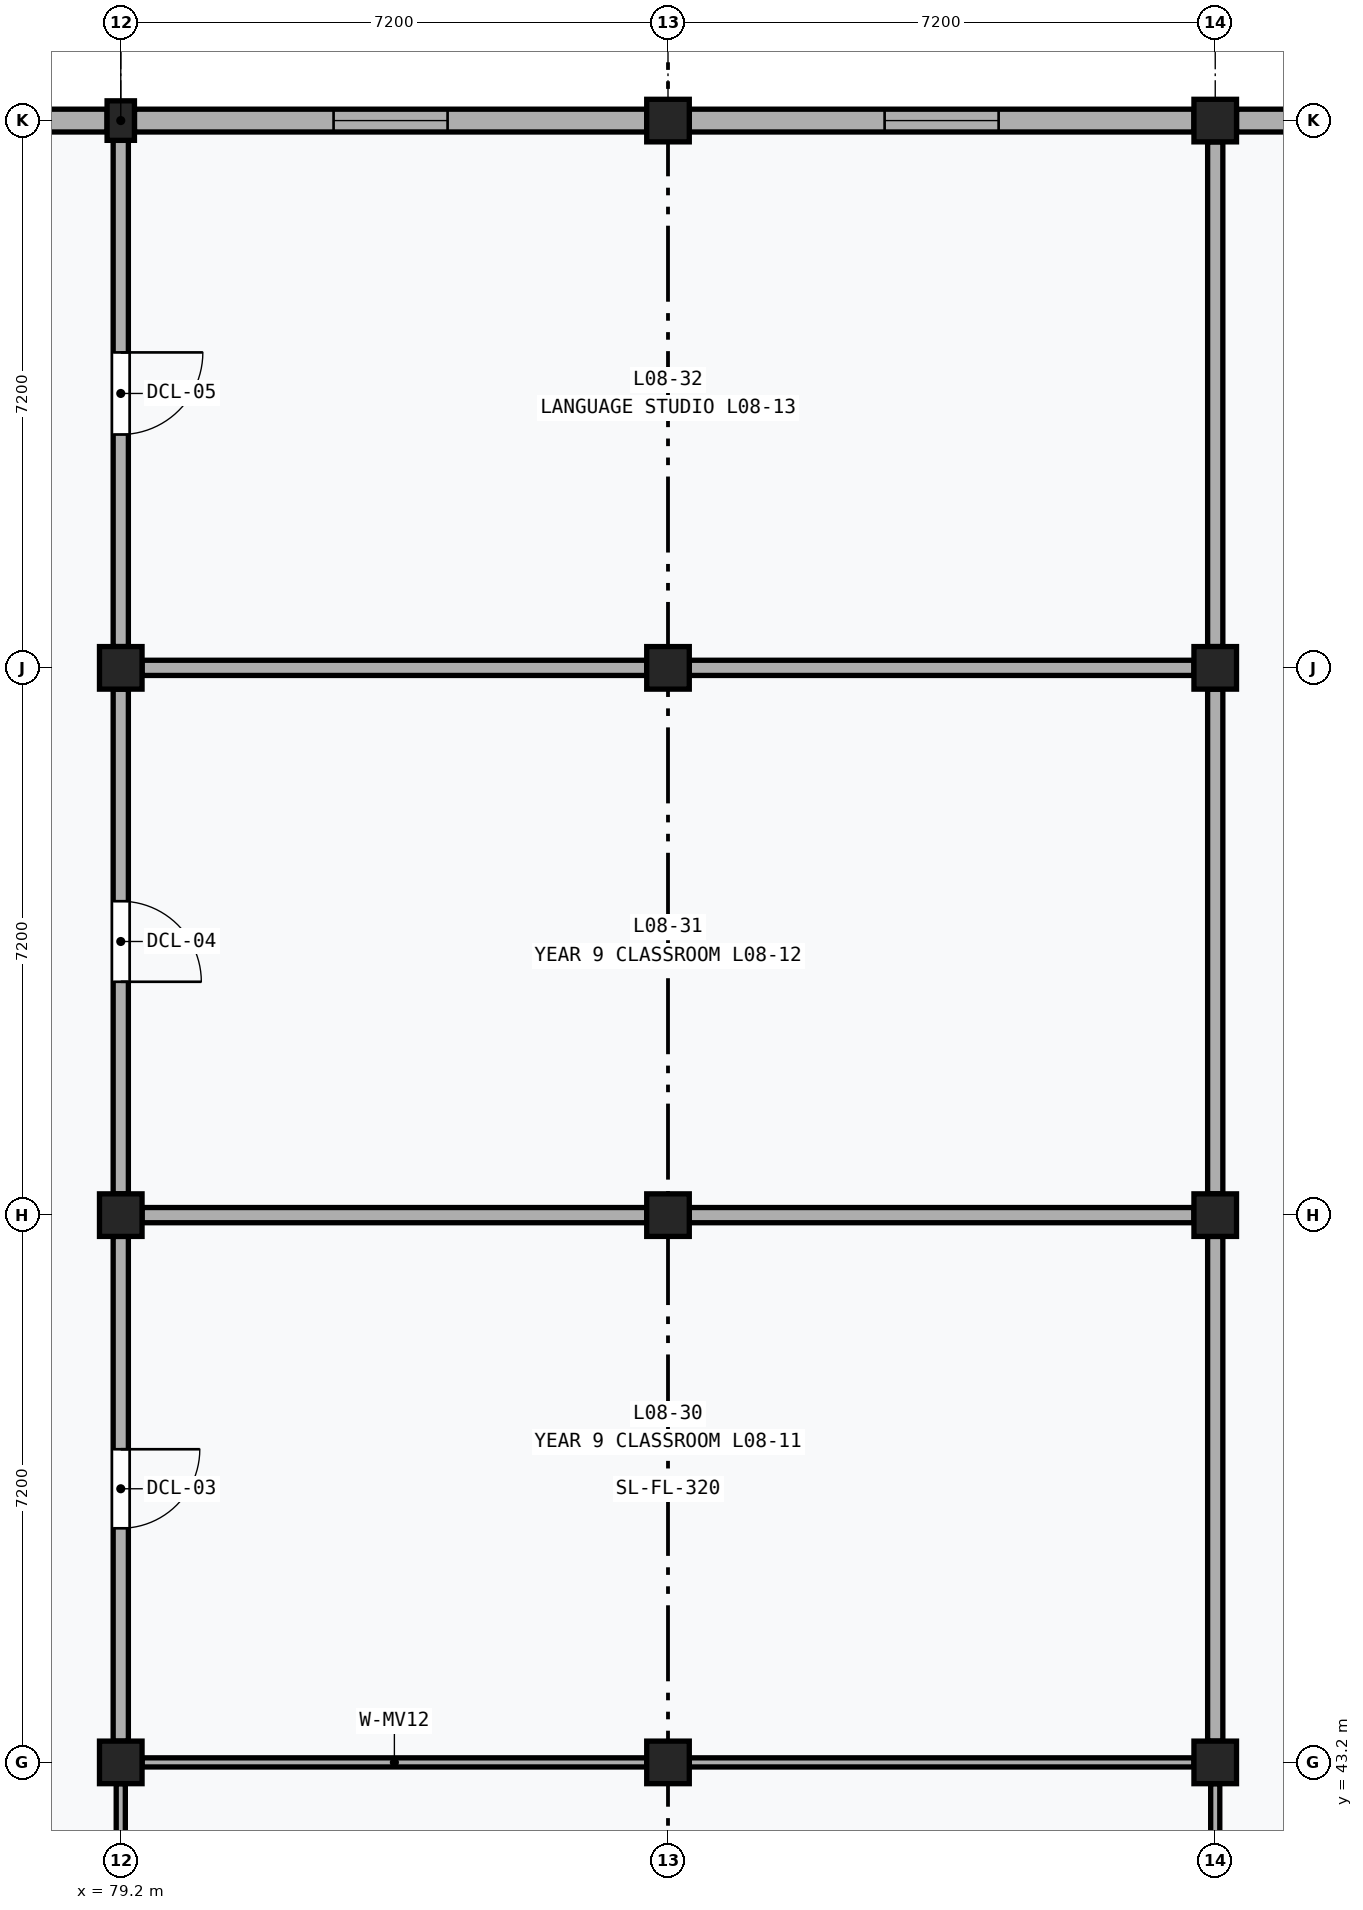
"""IFC4 building model, lengths in metres.
Left out: names, types, materials, properties, quantities, classifications, styles, units other than length and angle.
Written with IfcOpenShell. Run it as: python <this file> out.ifc"""

import sys

from ifc_helpers import new_model, si_unit, direction, frame, frame_2d, origin, origin_2d, place, context, subcontext, project, spatial, rectangle, extrude, element, fill, save


model = new_model("IFC4")
c1 = context("Model", 3, precision=1e-05, world=origin(), true_north=direction((0.0, 1.0)))
c2 = subcontext(c1, "Body", "Model", "MODEL_VIEW")
j1 = project(units=[si_unit("LENGTHUNIT", "METRE"), si_unit("PLANEANGLEUNIT", "RADIAN")], contexts=[c1])
p1 = place(None, origin())
s1 = spatial("IfcSite", under=j1, at=p1, CompositionType="ELEMENT")
p2 = place(p1, origin())
s2 = spatial("IfcBuilding", under=s1, at=p2, CompositionType="ELEMENT")
p3 = place(p2, frame((0.0, 0.0, 34.8)))
s3 = spatial("IfcBuildingStorey", under=s2, at=p3, CompositionType="ELEMENT", Elevation=34.8)
for number, where, z_axis, x_axis in (
    (1, (79.2, 43.2, 0.0), (0.0, 0.0, 1.0), (1.0, 0.0, 0.0)),
    (2, (79.2, 50.4, 0.0), (0.0, 0.0, 1.0), (1.0, 0.0, 0.0)),
    (3, (79.2, 57.6, 0.0), (0.0, 0.0, 1.0), (1.0, 0.0, 0.0)),
):
    element("IfcColumn", number, at=place(p3, frame(where, z_axis=z_axis, x_axis=x_axis)), inside=s3, PredefinedType="COLUMN", context=c2, shape_type="SweptSolid", body=[
        extrude(rectangle(XDim=0.56, YDim=0.56, at=origin_2d()), origin(), (0.0, 0.0, 1.0), 4.0),
    ])
p4 = place(p3, frame((79.2, 64.8, 0.0), z_axis=(0.0, 0.0, 1.0), x_axis=(1.0, 0.0, 0.0)))
e4 = element("IfcColumn", 4, at=p4, inside=s3, PredefinedType="PILASTER", context=c2, shape_type="SweptSolid", body=[
    extrude(rectangle(XDim=0.36, YDim=0.52, at=origin_2d()), origin(), (0.0, 0.0, 1.0), 4.0),
])
for number, where, z_axis, x_axis in (
    (5, (86.4, 43.2, 0.0), (0.0, 0.0, 1.0), (1.0, 0.0, 0.0)),
    (6, (86.4, 50.4, 0.0), (0.0, 0.0, 1.0), (1.0, 0.0, 0.0)),
    (7, (86.4, 57.6, 0.0), (0.0, 0.0, 1.0), (1.0, 0.0, 0.0)),
    (8, (86.4, 64.8, 0.0), (0.0, 0.0, 1.0), (1.0, 0.0, 0.0)),
    (9, (93.6, 43.2, 0.0), (0.0, 0.0, 1.0), (1.0, 0.0, 0.0)),
    (10, (93.6, 50.4, 0.0), (0.0, 0.0, 1.0), (1.0, 0.0, 0.0)),
    (11, (93.6, 57.6, 0.0), (0.0, 0.0, 1.0), (1.0, 0.0, 0.0)),
    (12, (93.6, 64.8, 0.0), (0.0, 0.0, 1.0), (1.0, 0.0, 0.0)),
):
    element("IfcColumn", number, at=place(p3, frame(where, z_axis=z_axis, x_axis=x_axis)), inside=s3, PredefinedType="COLUMN", context=c2, shape_type="SweptSolid", body=[
        extrude(rectangle(XDim=0.56, YDim=0.56, at=origin_2d()), origin(), (0.0, 0.0, 1.0), 4.0),
    ])
p5 = place(p3, frame((72.28, 64.8, 0.0), z_axis=(0.0, 0.0, 1.0), x_axis=(1.0, 0.0, 0.0)))
e13 = element("IfcWall", 13, at=p5, inside=s3, PredefinedType="SOLIDWALL", context=c2, shape_type="SweptSolid", body=[
    extrude(rectangle(XDim=6.74, YDim=0.3, at=frame_2d((3.37, 0.0))), origin(), (0.0, 0.0, 1.0), 3.19),
])
p6 = place(p5, frame((2.495, 0.0, 1.2)))
e14 = element("IfcOpeningElement", 14, at=p6, cuts=e13, PredefinedType="OPENING", context=c2, shape_type="SweptSolid", body=[
    extrude(rectangle(XDim=1.75, YDim=1.35, at=frame_2d((0.875, 0.675))), frame((0.0, 0.162, 0.0), z_axis=(0.0, -1.0, 0.0), x_axis=(1.0, 0.0, 0.0)), (0.0, 0.0, 1.0), 0.324),
])
p7 = place(p3, frame((79.38, 64.8, 0.0), z_axis=(0.0, 0.0, 1.0), x_axis=(1.0, 0.0, 0.0)))
e15 = element("IfcWall", 15, at=p7, inside=s3, PredefinedType="SOLIDWALL", context=c2, shape_type="SweptSolid", body=[
    extrude(rectangle(XDim=6.74, YDim=0.3, at=frame_2d((3.37, 0.0))), origin(), (0.0, 0.0, 1.0), 3.19),
])
p8 = place(p7, frame((2.62, 0.0, 1.1)))
e16 = element("IfcOpeningElement", 16, at=p8, cuts=e15, PredefinedType="OPENING", context=c2, shape_type="SweptSolid", body=[
    extrude(rectangle(XDim=1.5, YDim=1.35, at=frame_2d((0.75, 0.675))), frame((0.0, 0.162, 0.0), z_axis=(0.0, -1.0, 0.0), x_axis=(1.0, 0.0, 0.0)), (0.0, 0.0, 1.0), 0.324),
])
p9 = place(p3, frame((86.68, 64.8, 0.0), z_axis=(0.0, 0.0, 1.0), x_axis=(1.0, 0.0, 0.0)))
e17 = element("IfcWall", 17, at=p9, inside=s3, PredefinedType="SOLIDWALL", context=c2, shape_type="SweptSolid", body=[
    extrude(rectangle(XDim=6.64, YDim=0.3, at=frame_2d((3.32, 0.0))), origin(), (0.0, 0.0, 1.0), 3.19),
])
p10 = place(p9, frame((2.57, 0.0, 1.1)))
e18 = element("IfcOpeningElement", 18, at=p10, cuts=e17, PredefinedType="OPENING", context=c2, shape_type="SweptSolid", body=[
    extrude(rectangle(XDim=1.5, YDim=1.35, at=frame_2d((0.75, 0.675))), frame((0.0, 0.162, 0.0), z_axis=(0.0, -1.0, 0.0), x_axis=(1.0, 0.0, 0.0)), (0.0, 0.0, 1.0), 0.324),
])
p11 = place(p3, frame((93.88, 64.8, 0.0), z_axis=(0.0, 0.0, 1.0), x_axis=(1.0, 0.0, 0.0)))
e19 = element("IfcWall", 19, at=p11, inside=s3, PredefinedType="SOLIDWALL", context=c2, shape_type="SweptSolid", body=[
    extrude(rectangle(XDim=6.64, YDim=0.3, at=frame_2d((3.32, 0.0))), origin(), (0.0, 0.0, 1.0), 3.19),
])
p12 = place(p11, frame((2.57, 0.0, 1.1)))
e20 = element("IfcOpeningElement", 20, at=p12, cuts=e19, PredefinedType="OPENING", context=c2, shape_type="SweptSolid", body=[
    extrude(rectangle(XDim=1.5, YDim=1.35, at=frame_2d((0.75, 0.675))), frame((0.0, 0.162, 0.0), z_axis=(0.0, -1.0, 0.0), x_axis=(1.0, 0.0, 0.0)), (0.0, 0.0, 1.0), 0.324),
])
p13 = place(p3, frame((79.48, 43.2, 0.0), z_axis=(0.0, 0.0, 1.0), x_axis=(1.0, 0.0, 0.0)))
e21 = element("IfcWall", 21, at=p13, inside=s3, PredefinedType="MOVABLE", context=c2, shape_type="SweptSolid", body=[
    extrude(rectangle(XDim=6.64, YDim=0.12, at=frame_2d((3.32, 0.0))), origin(), (0.0, 0.0, 1.0), 3.03),
])
p14 = place(p3, frame((79.2, 36.28, 0.0), z_axis=(0.0, 0.0, 1.0), x_axis=(0.0, 1.0, 0.0)))
e22 = element("IfcWall", 22, at=p14, inside=s3, PredefinedType="MOVABLE", context=c2, shape_type="SweptSolid", body=[
    extrude(rectangle(XDim=6.64, YDim=0.12, at=frame_2d((3.32, 0.0))), origin(), (0.0, 0.0, 1.0), 3.03),
])
p15 = place(p14, frame((2.81, 0.0, 0.0)))
e23 = element("IfcOpeningElement", 23, at=p15, cuts=e22, PredefinedType="OPENING", context=c2, shape_type="SweptSolid", body=[
    extrude(rectangle(XDim=1.02, YDim=2.12, at=frame_2d((0.51, 1.06))), frame((0.0, 0.072, 0.0), z_axis=(0.0, -1.0, 0.0), x_axis=(1.0, 0.0, 0.0)), (0.0, 0.0, 1.0), 0.144),
])
p16 = place(p3, frame((86.68, 43.2, 0.0), z_axis=(0.0, 0.0, 1.0), x_axis=(1.0, 0.0, 0.0)))
e24 = element("IfcWall", 24, at=p16, inside=s3, PredefinedType="MOVABLE", context=c2, shape_type="SweptSolid", body=[
    extrude(rectangle(XDim=6.64, YDim=0.12, at=frame_2d((3.32, 0.0))), origin(), (0.0, 0.0, 1.0), 3.03),
])
p17 = place(p3, frame((93.6, 36.28, 0.0), z_axis=(0.0, 0.0, 1.0), x_axis=(0.0, 1.0, 0.0)))
e25 = element("IfcWall", 25, at=p17, inside=s3, PredefinedType="MOVABLE", context=c2, shape_type="SweptSolid", body=[
    extrude(rectangle(XDim=6.64, YDim=0.12, at=frame_2d((3.32, 0.0))), origin(), (0.0, 0.0, 1.0), 3.03),
])
p18 = place(p3, frame((79.48, 50.4, 0.0), z_axis=(0.0, 0.0, 1.0), x_axis=(1.0, 0.0, 0.0)))
e26 = element("IfcWall", 26, at=p18, inside=s3, PredefinedType="PARTITIONING", context=c2, shape_type="SweptSolid", body=[
    extrude(rectangle(XDim=6.64, YDim=0.2, at=frame_2d((3.32, 0.0))), origin(), (0.0, 0.0, 1.0), 3.03),
])
p19 = place(p3, frame((79.2, 43.48, 0.0), z_axis=(0.0, 0.0, 1.0), x_axis=(0.0, 1.0, 0.0)))
e27 = element("IfcWall", 27, at=p19, inside=s3, PredefinedType="PARTITIONING", context=c2, shape_type="SweptSolid", body=[
    extrude(rectangle(XDim=6.64, YDim=0.2, at=frame_2d((3.32, 0.0))), origin(), (0.0, 0.0, 1.0), 3.03),
])
p20 = place(p19, frame((2.8, 0.0, 0.0)))
e28 = element("IfcOpeningElement", 28, at=p20, cuts=e27, PredefinedType="OPENING", context=c2, shape_type="SweptSolid", body=[
    extrude(rectangle(XDim=1.04, YDim=2.14, at=frame_2d((0.52, 1.07))), frame((0.0, 0.112, 0.0), z_axis=(0.0, -1.0, 0.0), x_axis=(1.0, 0.0, 0.0)), (0.0, 0.0, 1.0), 0.224),
])
for number, where, z_axis, x_axis in (
    (29, (86.68, 50.4, 0.0), (0.0, 0.0, 1.0), (1.0, 0.0, 0.0)),
    (30, (93.6, 43.48, 0.0), (0.0, 0.0, 1.0), (0.0, 1.0, 0.0)),
    (31, (79.48, 57.6, 0.0), (0.0, 0.0, 1.0), (1.0, 0.0, 0.0)),
):
    element("IfcWall", number, at=place(p3, frame(where, z_axis=z_axis, x_axis=x_axis)), inside=s3, PredefinedType="PARTITIONING", context=c2, shape_type="SweptSolid", body=[
        extrude(rectangle(XDim=6.64, YDim=0.2, at=frame_2d((3.32, 0.0))), origin(), (0.0, 0.0, 1.0), 3.03),
    ])
p21 = place(p3, frame((79.2, 50.68, 0.0), z_axis=(0.0, 0.0, 1.0), x_axis=(0.0, 1.0, 0.0)))
e32 = element("IfcWall", 32, at=p21, inside=s3, PredefinedType="PARTITIONING", context=c2, shape_type="SweptSolid", body=[
    extrude(rectangle(XDim=6.64, YDim=0.2, at=frame_2d((3.32, 0.0))), origin(), (0.0, 0.0, 1.0), 3.03),
])
p22 = place(p21, frame((2.79, 0.0, 0.0)))
e33 = element("IfcOpeningElement", 33, at=p22, cuts=e32, PredefinedType="OPENING", context=c2, shape_type="SweptSolid", body=[
    extrude(rectangle(XDim=1.06, YDim=2.16, at=frame_2d((0.53, 1.08))), frame((0.0, 0.112, 0.0), z_axis=(0.0, -1.0, 0.0), x_axis=(1.0, 0.0, 0.0)), (0.0, 0.0, 1.0), 0.224),
])
for number, where, z_axis, x_axis in (
    (34, (86.68, 57.6, 0.0), (0.0, 0.0, 1.0), (1.0, 0.0, 0.0)),
    (35, (93.6, 50.68, 0.0), (0.0, 0.0, 1.0), (0.0, 1.0, 0.0)),
):
    element("IfcWall", number, at=place(p3, frame(where, z_axis=z_axis, x_axis=x_axis)), inside=s3, PredefinedType="PARTITIONING", context=c2, shape_type="SweptSolid", body=[
        extrude(rectangle(XDim=6.64, YDim=0.2, at=frame_2d((3.32, 0.0))), origin(), (0.0, 0.0, 1.0), 3.03),
    ])
p23 = place(p3, frame((79.2, 57.88, 0.0), z_axis=(0.0, 0.0, 1.0), x_axis=(0.0, 1.0, 0.0)))
e36 = element("IfcWall", 36, at=p23, inside=s3, PredefinedType="PARTITIONING", context=c2, shape_type="SweptSolid", body=[
    extrude(rectangle(XDim=6.66, YDim=0.2, at=frame_2d((3.33, 0.0))), origin(), (0.0, 0.0, 1.0), 3.03),
])
p24 = place(p23, frame((2.79, 0.0, 0.0)))
e37 = element("IfcOpeningElement", 37, at=p24, cuts=e36, PredefinedType="OPENING", context=c2, shape_type="SweptSolid", body=[
    extrude(rectangle(XDim=1.08, YDim=2.18, at=frame_2d((0.54, 1.09))), frame((0.0, 0.112, 0.0), z_axis=(0.0, -1.0, 0.0), x_axis=(1.0, 0.0, 0.0)), (0.0, 0.0, 1.0), 0.224),
])
p25 = place(p3, frame((93.6, 57.88, 0.0), z_axis=(0.0, 0.0, 1.0), x_axis=(0.0, 1.0, 0.0)))
e38 = element("IfcWall", 38, at=p25, inside=s3, PredefinedType="PARTITIONING", context=c2, shape_type="SweptSolid", body=[
    extrude(rectangle(XDim=6.64, YDim=0.2, at=frame_2d((3.32, 0.0))), origin(), (0.0, 0.0, 1.0), 3.03),
])
p26 = place(p8, origin())
e39 = element("IfcWindow", 39, at=p26, inside=s3, PartitioningType="SINGLE_PANEL", PredefinedType="WINDOW", context=c2, shape_type="SweptSolid", body=[
    extrude(rectangle(XDim=1.5, YDim=1.35, at=frame_2d((0.75, 0.675))), frame((0.0, 0.03, 0.0), z_axis=(0.0, -1.0, 0.0), x_axis=(1.0, 0.0, 0.0)), (0.0, 0.0, 1.0), 0.06),
])
fill(e16, e39)
p27 = place(p10, origin())
e40 = element("IfcWindow", 40, at=p27, inside=s3, PartitioningType="SINGLE_PANEL", PredefinedType="WINDOW", context=c2, shape_type="SweptSolid", body=[
    extrude(rectangle(XDim=1.5, YDim=1.35, at=frame_2d((0.75, 0.675))), frame((0.0, 0.03, 0.0), z_axis=(0.0, -1.0, 0.0), x_axis=(1.0, 0.0, 0.0)), (0.0, 0.0, 1.0), 0.06),
])
fill(e18, e40)
p28 = place(p20, frame((1.04, 0.0, 0.0), z_axis=(0.0, 0.0, 1.0), x_axis=(-1.0, 0.0, 0.0)))
e41 = element("IfcDoor", 41, at=p28, inside=s3, OperationType="SINGLE_SWING_LEFT", PredefinedType="DOOR", context=c2, shape_type="SweptSolid", body=[
    extrude(rectangle(XDim=1.04, YDim=2.14, at=frame_2d((0.52, 1.07))), frame((0.0, 0.025, 0.0), z_axis=(0.0, -1.0, 0.0), x_axis=(1.0, 0.0, 0.0)), (0.0, 0.0, 1.0), 0.05),
])
fill(e28, e41)
p29 = place(p22, frame((1.06, 0.0, 0.0), z_axis=(0.0, 0.0, 1.0), x_axis=(-1.0, 0.0, 0.0)))
e42 = element("IfcDoor", 42, at=p29, inside=s3, OperationType="SINGLE_SWING_RIGHT", PredefinedType="DOOR", context=c2, shape_type="SweptSolid", body=[
    extrude(rectangle(XDim=1.06, YDim=2.16, at=frame_2d((0.53, 1.08))), frame((0.0, 0.025, 0.0), z_axis=(0.0, -1.0, 0.0), x_axis=(1.0, 0.0, 0.0)), (0.0, 0.0, 1.0), 0.05),
])
fill(e33, e42)
p30 = place(p24, frame((1.08, 0.0, 0.0), z_axis=(0.0, 0.0, 1.0), x_axis=(-1.0, 0.0, 0.0)))
e43 = element("IfcDoor", 43, at=p30, inside=s3, OperationType="SINGLE_SWING_LEFT", PredefinedType="DOOR", context=c2, shape_type="SweptSolid", body=[
    extrude(rectangle(XDim=1.08, YDim=2.18, at=frame_2d((0.54, 1.09))), frame((0.0, 0.025, 0.0), z_axis=(0.0, -1.0, 0.0), x_axis=(1.0, 0.0, 0.0)), (0.0, 0.0, 1.0), 0.05),
])
fill(e37, e43)
save(model, sys.argv[1])
